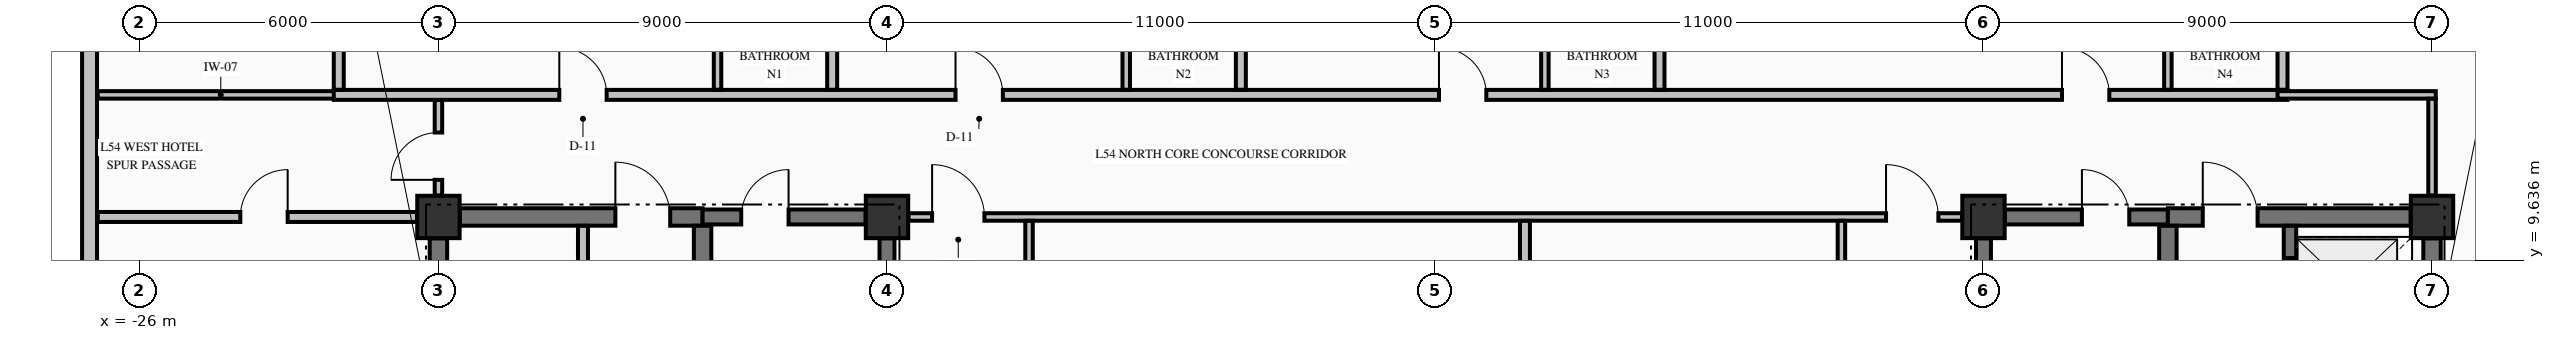
"""IFC4 building model, lengths in metres.
Left out: names, types, materials, properties, quantities, classifications, styles, units other than length and angle.
Written with IfcOpenShell. Run it as: python <this file> out.ifc"""

import sys

from ifc_helpers import new_model, si_unit, direction, frame, frame_2d, origin, origin_2d, place, context, subcontext, project, spatial, rectangle, extrude, element, fill, save


model = new_model("IFC4")
c1 = context("Model", 3, precision=1e-05, world=origin(), true_north=direction((0.0, 1.0)))
c2 = subcontext(c1, "Body", "Model", "MODEL_VIEW")
j1 = project(units=[si_unit("LENGTHUNIT", "METRE"), si_unit("PLANEANGLEUNIT", "RADIAN")], contexts=[c1])
p1 = place(None, origin())
s1 = spatial("IfcSite", under=j1, at=p1, CompositionType="ELEMENT")
p2 = place(p1, origin())
s2 = spatial("IfcBuilding", under=s1, at=p2, CompositionType="ELEMENT")
p3 = place(p2, frame((0.0, 0.0, 208.46)))
s3 = spatial("IfcBuildingStorey", under=s2, at=p3, CompositionType="ELEMENT", Elevation=208.46)
for number, where, z_axis, x_axis in (
    (1, (-20.0, 10.5, -0.25), (0.0, 0.0, 1.0), (1.0, 0.0, 0.0)),
    (2, (-11.0, 10.5, -0.25), (0.0, 0.0, 1.0), (1.0, 0.0, 0.0)),
    (3, (11.0, 10.5, -0.25), (0.0, 0.0, 1.0), (1.0, 0.0, 0.0)),
    (4, (20.0, 10.5, -0.25), (0.0, 0.0, 1.0), (1.0, 0.0, 0.0)),
):
    element("IfcColumn", number, at=place(p3, frame(where, z_axis=z_axis, x_axis=x_axis)), inside=s3, PredefinedType="COLUMN", context=c2, shape_type="SweptSolid", body=[
        extrude(rectangle(XDim=0.85, YDim=0.85, at=origin_2d()), origin(), (0.0, 0.0, 1.0), 3.325),
    ])
p4 = place(p3, frame((-27.0, 18.97, 0.0), z_axis=(0.0, 0.0, 1.0), x_axis=(0.0, -1.0, 0.0)))
e5 = element("IfcWall", 5, at=p4, inside=s3, PredefinedType="STANDARD", context=c2, shape_type="SweptSolid", body=[
    extrude(rectangle(XDim=9.44, YDim=0.3, at=frame_2d((4.72, 0.0))), origin(), (0.0, 0.0, 1.0), 2.467),
])
p5 = place(p3, frame((-19.571, 10.5, 0.0), z_axis=(0.0, 0.0, 1.0), x_axis=(1.0, 0.0, 0.0)))
e6 = element("IfcWall", 6, at=p5, inside=s3, PredefinedType="SHEAR", context=c2, shape_type="SweptSolid", body=[
    extrude(rectangle(XDim=4.871, YDim=0.35, at=frame_2d((2.436, 0.0))), origin(), (0.0, 0.0, 1.0), 3.075),
])
p6 = place(p5, frame((3.121, 0.0, 0.0)))
e7 = element("IfcOpeningElement", 7, at=p6, cuts=e6, PredefinedType="OPENING", context=c2, shape_type="SweptSolid", body=[
    extrude(rectangle(XDim=1.1, YDim=2.15, at=frame_2d((0.55, 1.075))), frame((0.0, 0.185, 0.0), z_axis=(0.0, -1.0, 0.0), x_axis=(1.0, 0.0, 0.0)), (0.0, 0.0, 1.0), 0.37),
])
p7 = place(p3, frame((-14.7, 10.5, 0.0), z_axis=(0.0, 0.0, 1.0), x_axis=(1.0, 0.0, 0.0)))
e8 = element("IfcWall", 8, at=p7, inside=s3, PredefinedType="SHEAR", context=c2, shape_type="SweptSolid", body=[
    extrude(rectangle(XDim=3.271, YDim=0.3, at=frame_2d((1.635, 0.0))), origin(), (0.0, 0.0, 1.0), 3.075),
])
p8 = place(p7, frame((0.775, 0.0, 0.0)))
e9 = element("IfcOpeningElement", 9, at=p8, cuts=e8, PredefinedType="OPENING", context=c2, shape_type="SweptSolid", body=[
    extrude(rectangle(XDim=0.95, YDim=2.15, at=frame_2d((0.475, 1.075))), frame((0.0, 0.16, 0.0), z_axis=(0.0, -1.0, 0.0), x_axis=(1.0, 0.0, 0.0)), (0.0, 0.0, 1.0), 0.32),
])
p9 = place(p3, frame((11.429, 10.5, 0.0), z_axis=(0.0, 0.0, 1.0), x_axis=(1.0, 0.0, 0.0)))
e10 = element("IfcWall", 10, at=p9, inside=s3, PredefinedType="SHEAR", context=c2, shape_type="SweptSolid", body=[
    extrude(rectangle(XDim=3.271, YDim=0.3, at=frame_2d((1.635, 0.0))), origin(), (0.0, 0.0, 1.0), 3.075),
])
p10 = place(p9, frame((1.546, 0.0, 0.0)))
e11 = element("IfcOpeningElement", 11, at=p10, cuts=e10, PredefinedType="OPENING", context=c2, shape_type="SweptSolid", body=[
    extrude(rectangle(XDim=0.95, YDim=2.15, at=frame_2d((0.475, 1.075))), frame((0.0, 0.16, 0.0), z_axis=(0.0, -1.0, 0.0), x_axis=(1.0, 0.0, 0.0)), (0.0, 0.0, 1.0), 0.32),
])
p11 = place(p3, frame((14.7, 10.5, 0.0), z_axis=(0.0, 0.0, 1.0), x_axis=(1.0, 0.0, 0.0)))
e12 = element("IfcWall", 12, at=p11, inside=s3, PredefinedType="SHEAR", context=c2, shape_type="SweptSolid", body=[
    extrude(rectangle(XDim=4.871, YDim=0.35, at=frame_2d((2.436, 0.0))), origin(), (0.0, 0.0, 1.0), 3.075),
])
p12 = place(p11, frame((0.7, 0.0, 0.0)))
e13 = element("IfcOpeningElement", 13, at=p12, cuts=e12, PredefinedType="OPENING", context=c2, shape_type="SweptSolid", body=[
    extrude(rectangle(XDim=1.1, YDim=2.15, at=frame_2d((0.55, 1.075))), frame((0.0, 0.185, 0.0), z_axis=(0.0, -1.0, 0.0), x_axis=(1.0, 0.0, 0.0)), (0.0, 0.0, 1.0), 0.37),
])
p13 = place(p3, frame((-26.835, 10.5, 0.0), z_axis=(0.0, 0.0, 1.0), x_axis=(1.0, 0.0, 0.0)))
e14 = element("IfcWall", 14, at=p13, inside=s3, PredefinedType="PARTITIONING", context=c2, shape_type="SweptSolid", body=[
    extrude(rectangle(XDim=6.404, YDim=0.2, at=frame_2d((3.202, 0.0))), origin(), (0.0, 0.0, 1.0), 3.075),
])
p14 = place(p13, frame((2.86, 0.0, 0.0)))
e15 = element("IfcOpeningElement", 15, at=p14, cuts=e14, PredefinedType="OPENING", context=c2, shape_type="SweptSolid", body=[
    extrude(rectangle(XDim=0.95, YDim=2.15, at=frame_2d((0.475, 1.075))), frame((0.0, 0.11, 0.0), z_axis=(0.0, -1.0, 0.0), x_axis=(1.0, 0.0, 0.0)), (0.0, 0.0, 1.0), 0.22),
])
p15 = place(p3, frame((-10.569, 10.5, 0.0), z_axis=(0.0, 0.0, 1.0), x_axis=(1.0, 0.0, 0.0)))
e16 = element("IfcWall", 16, at=p15, inside=s3, PredefinedType="PARTITIONING", context=c2, shape_type="SweptSolid", body=[
    extrude(rectangle(XDim=21.138, YDim=0.15, at=frame_2d((10.569, 0.0))), origin(), (0.0, 0.0, 1.0), 3.075),
])
p16 = place(p15, frame((0.474, 0.0, 0.0)))
e17 = element("IfcOpeningElement", 17, at=p16, cuts=e16, PredefinedType="OPENING", context=c2, shape_type="SweptSolid", body=[
    extrude(rectangle(XDim=1.05, YDim=2.15, at=frame_2d((0.525, 1.075))), frame((0.0, 0.085, 0.0), z_axis=(0.0, -1.0, 0.0), x_axis=(1.0, 0.0, 0.0)), (0.0, 0.0, 1.0), 0.17),
])
p17 = place(p15, frame((19.614, 0.0, 0.0)))
e18 = element("IfcOpeningElement", 18, at=p17, cuts=e16, PredefinedType="OPENING", context=c2, shape_type="SweptSolid", body=[
    extrude(rectangle(XDim=1.05, YDim=2.15, at=frame_2d((0.525, 1.075))), frame((0.0, 0.085, 0.0), z_axis=(0.0, -1.0, 0.0), x_axis=(1.0, 0.0, 0.0)), (0.0, 0.0, 1.0), 0.17),
])
p18 = place(p3, frame((-26.835, 12.95, 0.0), z_axis=(0.0, 0.0, 1.0), x_axis=(1.0, 0.0, 0.0)))
e19 = element("IfcWall", 19, at=p18, inside=s3, PredefinedType="PARTITIONING", context=c2, shape_type="SweptSolid", body=[
    extrude(rectangle(XDim=4.935, YDim=0.15, at=frame_2d((2.468, 0.0))), origin(), (0.0, 0.0, 1.0), 3.075),
])
p19 = place(p3, frame((-22.1, 12.95, 0.0), z_axis=(0.0, 0.0, 1.0), x_axis=(1.0, 0.0, 0.0)))
e20 = element("IfcWall", 20, at=p19, inside=s3, PredefinedType="PARTITIONING", context=c2, shape_type="SweptSolid", body=[
    extrude(rectangle(XDim=39.2, YDim=0.2, at=frame_2d((19.6, 0.0))), origin(), (0.0, 0.0, 1.0), 3.075),
])
p20 = place(p19, frame((4.525, 0.0, 0.0)))
e21 = element("IfcOpeningElement", 21, at=p20, cuts=e20, PredefinedType="OPENING", context=c2, shape_type="SweptSolid", body=[
    extrude(rectangle(XDim=0.95, YDim=2.15, at=frame_2d((0.475, 1.075))), frame((0.0, 0.11, 0.0), z_axis=(0.0, -1.0, 0.0), x_axis=(1.0, 0.0, 0.0)), (0.0, 0.0, 1.0), 0.22),
])
p21 = place(p19, frame((12.475, 0.0, 0.0)))
e22 = element("IfcOpeningElement", 22, at=p21, cuts=e20, PredefinedType="OPENING", context=c2, shape_type="SweptSolid", body=[
    extrude(rectangle(XDim=0.95, YDim=2.15, at=frame_2d((0.475, 1.075))), frame((0.0, 0.11, 0.0), z_axis=(0.0, -1.0, 0.0), x_axis=(1.0, 0.0, 0.0)), (0.0, 0.0, 1.0), 0.22),
])
p22 = place(p19, frame((22.175, 0.0, 0.0)))
e23 = element("IfcOpeningElement", 23, at=p22, cuts=e20, PredefinedType="OPENING", context=c2, shape_type="SweptSolid", body=[
    extrude(rectangle(XDim=0.95, YDim=2.15, at=frame_2d((0.475, 1.075))), frame((0.0, 0.11, 0.0), z_axis=(0.0, -1.0, 0.0), x_axis=(1.0, 0.0, 0.0)), (0.0, 0.0, 1.0), 0.22),
])
p23 = place(p19, frame((34.675, 0.0, 0.0)))
e24 = element("IfcOpeningElement", 24, at=p23, cuts=e20, PredefinedType="OPENING", context=c2, shape_type="SweptSolid", body=[
    extrude(rectangle(XDim=0.95, YDim=2.15, at=frame_2d((0.475, 1.075))), frame((0.0, 0.11, 0.0), z_axis=(0.0, -1.0, 0.0), x_axis=(1.0, 0.0, 0.0)), (0.0, 0.0, 1.0), 0.22),
])
p24 = place(p3, frame((16.9, 12.95, 0.0), z_axis=(0.0, 0.0, 1.0), x_axis=(1.0, 0.0, 0.0)))
e25 = element("IfcWall", 25, at=p24, inside=s3, PredefinedType="PARTITIONING", context=c2, shape_type="SweptSolid", body=[
    extrude(rectangle(XDim=3.175, YDim=0.15, at=frame_2d((1.587, 0.0))), origin(), (0.0, 0.0, 1.0), 3.075),
])
p25 = place(p3, frame((-20.0, 5.327, 0.0), z_axis=(0.0, 0.0, 1.0), x_axis=(0.0, 1.0, 0.0)))
e26 = element("IfcWall", 26, at=p25, inside=s3, PredefinedType="SHEAR", context=c2, shape_type="SweptSolid", body=[
    extrude(rectangle(XDim=4.744, YDim=0.35, at=frame_2d((2.372, 0.0))), origin(), (0.0, 0.0, 1.0), 3.075),
])
p26 = place(p3, frame((-14.7, 5.852, 0.0), z_axis=(0.0, 0.0, 1.0), x_axis=(0.0, 1.0, 0.0)))
e27 = element("IfcWall", 27, at=p26, inside=s3, PredefinedType="SHEAR", context=c2, shape_type="SweptSolid", body=[
    extrude(rectangle(XDim=4.471, YDim=0.35, at=frame_2d((2.235, 0.0))), origin(), (0.0, 0.0, 1.0), 3.075),
])
for number, where, z_axis, x_axis in (
    (28, (-11.0, 5.852, 0.0), (0.0, 0.0, 1.0), (0.0, 1.0, 0.0)),
    (29, (11.0, 5.852, 0.0), (0.0, 0.0, 1.0), (0.0, 1.0, 0.0)),
):
    element("IfcWall", number, at=place(p3, frame(where, z_axis=z_axis, x_axis=x_axis)), inside=s3, PredefinedType="SHEAR", context=c2, shape_type="SweptSolid", body=[
        extrude(rectangle(XDim=4.219, YDim=0.3, at=frame_2d((2.109, 0.0))), origin(), (0.0, 0.0, 1.0), 3.075),
    ])
p27 = place(p3, frame((14.7, 5.852, 0.0), z_axis=(0.0, 0.0, 1.0), x_axis=(0.0, 1.0, 0.0)))
e30 = element("IfcWall", 30, at=p27, inside=s3, PredefinedType="SHEAR", context=c2, shape_type="SweptSolid", body=[
    extrude(rectangle(XDim=4.471, YDim=0.35, at=frame_2d((2.235, 0.0))), origin(), (0.0, 0.0, 1.0), 3.075),
])
p28 = place(p3, frame((17.15, 7.877, 0.0), z_axis=(0.0, 0.0, 1.0), x_axis=(0.0, 1.0, 0.0)))
e31 = element("IfcWall", 31, at=p28, inside=s3, PredefinedType="SOLIDWALL", context=c2, shape_type="SweptSolid", body=[
    extrude(rectangle(XDim=2.446, YDim=0.25, at=frame_2d((1.223, 0.0))), origin(), (0.0, 0.0, 1.0), 3.075),
])
p29 = place(p28, frame((0.698, 0.0, 0.0)))
e32 = element("IfcOpeningElement", 32, at=p29, cuts=e31, PredefinedType="OPENING", context=c2, shape_type="SweptSolid", body=[
    extrude(rectangle(XDim=1.1, YDim=2.2, at=frame_2d((0.55, 1.1))), frame((0.0, 0.135, 0.0), z_axis=(0.0, -1.0, 0.0), x_axis=(1.0, 0.0, 0.0)), (0.0, 0.0, 1.0), 0.27),
])
p30 = place(p3, frame((20.0, 7.877, 0.0), z_axis=(0.0, 0.0, 1.0), x_axis=(0.0, 1.0, 0.0)))
e33 = element("IfcWall", 33, at=p30, inside=s3, PredefinedType="SHEAR", context=c2, shape_type="SweptSolid", body=[
    extrude(rectangle(XDim=2.194, YDim=0.35, at=frame_2d((1.097, 0.0))), origin(), (0.0, 0.0, 1.0), 3.075),
])
p31 = place(p3, frame((-22.0, 13.053, 0.0), z_axis=(0.0, 0.0, 1.0), x_axis=(0.0, 1.0, 0.0)))
e34 = element("IfcWall", 34, at=p31, inside=s3, PredefinedType="PARTITIONING", context=c2, shape_type="SweptSolid", body=[
    extrude(rectangle(XDim=5.941, YDim=0.2, at=frame_2d((2.97, 0.0))), origin(), (0.0, 0.0, 1.0), 3.075),
])
p32 = place(p3, frame((-20.0, 10.931, 0.0), z_axis=(0.0, 0.0, 1.0), x_axis=(0.0, 1.0, 0.0)))
e35 = element("IfcWall", 35, at=p32, inside=s3, PredefinedType="PARTITIONING", context=c2, shape_type="SweptSolid", body=[
    extrude(rectangle(XDim=1.916, YDim=0.15, at=frame_2d((0.958, 0.0))), origin(), (0.0, 0.0, 1.0), 2.267),
])
p33 = place(p32, frame((0.314, 0.0, 0.0)))
e36 = element("IfcOpeningElement", 36, at=p33, cuts=e35, PredefinedType="OPENING", context=c2, shape_type="SweptSolid", body=[
    extrude(rectangle(XDim=0.95, YDim=2.15, at=frame_2d((0.475, 1.075))), frame((0.0, 0.085, 0.0), z_axis=(0.0, -1.0, 0.0), x_axis=(1.0, 0.0, 0.0)), (0.0, 0.0, 1.0), 0.17),
])
p34 = place(p3, frame((-17.1, 5.328, 0.0), z_axis=(0.0, 0.0, 1.0), x_axis=(0.0, 1.0, 0.0)))
e37 = element("IfcWall", 37, at=p34, inside=s3, PredefinedType="PARTITIONING", context=c2, shape_type="SweptSolid", body=[
    extrude(rectangle(XDim=4.994, YDim=0.2, at=frame_2d((2.497, 0.0))), origin(), (0.0, 0.0, 1.0), 3.075),
])
p35 = place(p34, frame((2.072, 0.0, 0.0)))
e38 = element("IfcOpeningElement", 38, at=p35, cuts=e37, PredefinedType="OPENING", context=c2, shape_type="SweptSolid", body=[
    extrude(rectangle(XDim=0.9, YDim=2.15, at=frame_2d((0.45, 1.075))), frame((0.0, 0.11, 0.0), z_axis=(0.0, -1.0, 0.0), x_axis=(1.0, 0.0, 0.0)), (0.0, 0.0, 1.0), 0.22),
])
p36 = place(p3, frame((-14.4, 13.053, 0.0), z_axis=(0.0, 0.0, 1.0), x_axis=(0.0, 1.0, 0.0)))
e39 = element("IfcWall", 39, at=p36, inside=s3, PredefinedType="PARTITIONING", context=c2, shape_type="SweptSolid", body=[
    extrude(rectangle(XDim=2.669, YDim=0.15, at=frame_2d((1.334, 0.0))), origin(), (0.0, 0.0, 1.0), 3.075),
])
p37 = place(p3, frame((-12.1, 13.053, 0.0), z_axis=(0.0, 0.0, 1.0), x_axis=(0.0, 1.0, 0.0)))
e40 = element("IfcWall", 40, at=p37, inside=s3, PredefinedType="PARTITIONING", context=c2, shape_type="SweptSolid", body=[
    extrude(rectangle(XDim=2.669, YDim=0.2, at=frame_2d((1.334, 0.0))), origin(), (0.0, 0.0, 1.0), 3.075),
])
p38 = place(p3, frame((-8.15, 3.653, 0.0), z_axis=(0.0, 0.0, 1.0), x_axis=(0.0, 1.0, 0.0)))
e41 = element("IfcWall", 41, at=p38, inside=s3, PredefinedType="PARTITIONING", context=c2, shape_type="SweptSolid", body=[
    extrude(rectangle(XDim=6.769, YDim=0.15, at=frame_2d((3.385, 0.0))), origin(), (0.0, 0.0, 1.0), 3.075),
])
p39 = place(p38, frame((2.877, 0.0, 0.0)))
e42 = element("IfcOpeningElement", 42, at=p39, cuts=e41, PredefinedType="OPENING", context=c2, shape_type="SweptSolid", body=[
    extrude(rectangle(XDim=1.0, YDim=2.15, at=frame_2d((0.5, 1.075))), frame((0.0, 0.085, 0.0), z_axis=(0.0, -1.0, 0.0), x_axis=(1.0, 0.0, 0.0)), (0.0, 0.0, 1.0), 0.17),
])
p40 = place(p3, frame((-6.2, 13.053, 0.0), z_axis=(0.0, 0.0, 1.0), x_axis=(0.0, 1.0, 0.0)))
e43 = element("IfcWall", 43, at=p40, inside=s3, PredefinedType="PARTITIONING", context=c2, shape_type="SweptSolid", body=[
    extrude(rectangle(XDim=2.669, YDim=0.15, at=frame_2d((1.334, 0.0))), origin(), (0.0, 0.0, 1.0), 3.075),
])
p41 = place(p3, frame((-3.9, 13.053, 0.0), z_axis=(0.0, 0.0, 1.0), x_axis=(0.0, 1.0, 0.0)))
e44 = element("IfcWall", 44, at=p41, inside=s3, PredefinedType="PARTITIONING", context=c2, shape_type="SweptSolid", body=[
    extrude(rectangle(XDim=2.669, YDim=0.2, at=frame_2d((1.334, 0.0))), origin(), (0.0, 0.0, 1.0), 3.075),
])
p42 = place(p3, frame((1.8, 3.653, 0.0), z_axis=(0.0, 0.0, 1.0), x_axis=(0.0, 1.0, 0.0)))
e45 = element("IfcWall", 45, at=p42, inside=s3, PredefinedType="PARTITIONING", context=c2, shape_type="SweptSolid", body=[
    extrude(rectangle(XDim=6.769, YDim=0.2, at=frame_2d((3.385, 0.0))), origin(), (0.0, 0.0, 1.0), 3.075),
])
p43 = place(p3, frame((2.2, 13.053, 0.0), z_axis=(0.0, 0.0, 1.0), x_axis=(0.0, 1.0, 0.0)))
e46 = element("IfcWall", 46, at=p43, inside=s3, PredefinedType="PARTITIONING", context=c2, shape_type="SweptSolid", body=[
    extrude(rectangle(XDim=2.669, YDim=0.15, at=frame_2d((1.334, 0.0))), origin(), (0.0, 0.0, 1.0), 3.075),
])
p44 = place(p3, frame((4.5, 13.053, 0.0), z_axis=(0.0, 0.0, 1.0), x_axis=(0.0, 1.0, 0.0)))
e47 = element("IfcWall", 47, at=p44, inside=s3, PredefinedType="PARTITIONING", context=c2, shape_type="SweptSolid", body=[
    extrude(rectangle(XDim=2.669, YDim=0.2, at=frame_2d((1.334, 0.0))), origin(), (0.0, 0.0, 1.0), 3.075),
])
p45 = place(p3, frame((8.15, -2.097, 0.0), z_axis=(0.0, 0.0, 1.0), x_axis=(0.0, 1.0, 0.0)))
e48 = element("IfcWall", 48, at=p45, inside=s3, PredefinedType="PARTITIONING", context=c2, shape_type="SweptSolid", body=[
    extrude(rectangle(XDim=12.519, YDim=0.15, at=frame_2d((6.26, 0.0))), origin(), (0.0, 0.0, 1.0), 3.075),
])
p46 = place(p45, frame((5.697, 0.0, 0.0)))
e49 = element("IfcOpeningElement", 49, at=p46, cuts=e48, PredefinedType="OPENING", context=c2, shape_type="SweptSolid", body=[
    extrude(rectangle(XDim=1.1, YDim=2.15, at=frame_2d((0.55, 1.075))), frame((0.0, 0.085, 0.0), z_axis=(0.0, -1.0, 0.0), x_axis=(1.0, 0.0, 0.0)), (0.0, 0.0, 1.0), 0.17),
])
p47 = place(p3, frame((14.7, 13.053, 0.0), z_axis=(0.0, 0.0, 1.0), x_axis=(0.0, 1.0, 0.0)))
e50 = element("IfcWall", 50, at=p47, inside=s3, PredefinedType="PARTITIONING", context=c2, shape_type="SweptSolid", body=[
    extrude(rectangle(XDim=2.669, YDim=0.15, at=frame_2d((1.334, 0.0))), origin(), (0.0, 0.0, 1.0), 3.075),
])
p48 = place(p3, frame((17.0, 13.053, 0.0), z_axis=(0.0, 0.0, 1.0), x_axis=(0.0, 1.0, 0.0)))
e51 = element("IfcWall", 51, at=p48, inside=s3, PredefinedType="PARTITIONING", context=c2, shape_type="SweptSolid", body=[
    extrude(rectangle(XDim=2.669, YDim=0.2, at=frame_2d((1.334, 0.0))), origin(), (0.0, 0.0, 1.0), 3.075),
])
p49 = place(p3, frame((20.0, 10.931, 0.0), z_axis=(0.0, 0.0, 1.0), x_axis=(0.0, 1.0, 0.0)))
e52 = element("IfcWall", 52, at=p49, inside=s3, PredefinedType="PARTITIONING", context=c2, shape_type="SweptSolid", body=[
    extrude(rectangle(XDim=1.941, YDim=0.15, at=frame_2d((0.971, 0.0))), origin(), (0.0, 0.0, 1.0), 2.267),
])
p50 = place(p8, origin())
e53 = element("IfcDoor", 53, at=p50, inside=s3, OperationType="SINGLE_SWING_RIGHT", PredefinedType="DOOR", context=c2, shape_type="SweptSolid", body=[
    extrude(rectangle(XDim=0.95, YDim=2.15, at=frame_2d((0.475, 1.075))), frame((0.0, 0.025, 0.0), z_axis=(0.0, -1.0, 0.0), x_axis=(1.0, 0.0, 0.0)), (0.0, 0.0, 1.0), 0.05),
])
fill(e9, e53)
p51 = place(p10, origin())
e54 = element("IfcDoor", 54, at=p51, inside=s3, OperationType="SINGLE_SWING_LEFT", PredefinedType="DOOR", context=c2, shape_type="SweptSolid", body=[
    extrude(rectangle(XDim=0.95, YDim=2.15, at=frame_2d((0.475, 1.075))), frame((0.0, 0.025, 0.0), z_axis=(0.0, -1.0, 0.0), x_axis=(1.0, 0.0, 0.0)), (0.0, 0.0, 1.0), 0.05),
])
fill(e11, e54)
p52 = place(p6, origin())
e55 = element("IfcDoor", 55, at=p52, inside=s3, OperationType="SINGLE_SWING_LEFT", PredefinedType="DOOR", context=c2, shape_type="SweptSolid", body=[
    extrude(rectangle(XDim=1.1, YDim=2.15, at=frame_2d((0.55, 1.075))), frame((0.0, 0.025, 0.0), z_axis=(0.0, -1.0, 0.0), x_axis=(1.0, 0.0, 0.0)), (0.0, 0.0, 1.0), 0.05),
])
fill(e7, e55)
p53 = place(p29, origin())
e56 = element("IfcDoor", 56, at=p53, inside=s3, OperationType="SLIDING_TO_RIGHT", PredefinedType="DOOR", context=c2, shape_type="SweptSolid", body=[
    extrude(rectangle(XDim=1.1, YDim=2.2, at=frame_2d((0.55, 1.1))), frame((0.0, 0.025, 0.0), z_axis=(0.0, -1.0, 0.0), x_axis=(1.0, 0.0, 0.0)), (0.0, 0.0, 1.0), 0.05),
])
fill(e32, e56)
p54 = place(p12, origin())
e57 = element("IfcDoor", 57, at=p54, inside=s3, OperationType="SINGLE_SWING_LEFT", PredefinedType="DOOR", context=c2, shape_type="SweptSolid", body=[
    extrude(rectangle(XDim=1.1, YDim=2.15, at=frame_2d((0.55, 1.075))), frame((0.0, 0.025, 0.0), z_axis=(0.0, -1.0, 0.0), x_axis=(1.0, 0.0, 0.0)), (0.0, 0.0, 1.0), 0.05),
])
fill(e13, e57)
p55 = place(p16, origin())
e58 = element("IfcDoor", 58, at=p55, inside=s3, OperationType="SINGLE_SWING_LEFT", PredefinedType="DOOR", context=c2, shape_type="SweptSolid", body=[
    extrude(rectangle(XDim=1.05, YDim=2.15, at=frame_2d((0.525, 1.075))), frame((0.0, 0.025, 0.0), z_axis=(0.0, -1.0, 0.0), x_axis=(1.0, 0.0, 0.0)), (0.0, 0.0, 1.0), 0.05),
])
fill(e17, e58)
p56 = place(p17, origin())
e59 = element("IfcDoor", 59, at=p56, inside=s3, OperationType="SINGLE_SWING_LEFT", PredefinedType="DOOR", context=c2, shape_type="SweptSolid", body=[
    extrude(rectangle(XDim=1.05, YDim=2.15, at=frame_2d((0.525, 1.075))), frame((0.0, 0.025, 0.0), z_axis=(0.0, -1.0, 0.0), x_axis=(1.0, 0.0, 0.0)), (0.0, 0.0, 1.0), 0.05),
])
fill(e18, e59)
p57 = place(p20, origin())
e60 = element("IfcDoor", 60, at=p57, inside=s3, OperationType="SINGLE_SWING_LEFT", PredefinedType="DOOR", context=c2, shape_type="SweptSolid", body=[
    extrude(rectangle(XDim=0.95, YDim=2.15, at=frame_2d((0.475, 1.075))), frame((0.0, 0.025, 0.0), z_axis=(0.0, -1.0, 0.0), x_axis=(1.0, 0.0, 0.0)), (0.0, 0.0, 1.0), 0.05),
])
fill(e21, e60)
p58 = place(p21, origin())
e61 = element("IfcDoor", 61, at=p58, inside=s3, OperationType="SINGLE_SWING_LEFT", PredefinedType="DOOR", context=c2, shape_type="SweptSolid", body=[
    extrude(rectangle(XDim=0.95, YDim=2.15, at=frame_2d((0.475, 1.075))), frame((0.0, 0.025, 0.0), z_axis=(0.0, -1.0, 0.0), x_axis=(1.0, 0.0, 0.0)), (0.0, 0.0, 1.0), 0.05),
])
fill(e22, e61)
p59 = place(p22, origin())
e62 = element("IfcDoor", 62, at=p59, inside=s3, OperationType="SINGLE_SWING_LEFT", PredefinedType="DOOR", context=c2, shape_type="SweptSolid", body=[
    extrude(rectangle(XDim=0.95, YDim=2.15, at=frame_2d((0.475, 1.075))), frame((0.0, 0.025, 0.0), z_axis=(0.0, -1.0, 0.0), x_axis=(1.0, 0.0, 0.0)), (0.0, 0.0, 1.0), 0.05),
])
fill(e23, e62)
p60 = place(p23, origin())
e63 = element("IfcDoor", 63, at=p60, inside=s3, OperationType="SINGLE_SWING_LEFT", PredefinedType="DOOR", context=c2, shape_type="SweptSolid", body=[
    extrude(rectangle(XDim=0.95, YDim=2.15, at=frame_2d((0.475, 1.075))), frame((0.0, 0.025, 0.0), z_axis=(0.0, -1.0, 0.0), x_axis=(1.0, 0.0, 0.0)), (0.0, 0.0, 1.0), 0.05),
])
fill(e24, e63)
p61 = place(p33, origin())
e64 = element("IfcDoor", 64, at=p61, inside=s3, OperationType="SINGLE_SWING_LEFT", PredefinedType="DOOR", context=c2, shape_type="SweptSolid", body=[
    extrude(rectangle(XDim=0.95, YDim=2.15, at=frame_2d((0.475, 1.075))), frame((0.0, 0.025, 0.0), z_axis=(0.0, -1.0, 0.0), x_axis=(1.0, 0.0, 0.0)), (0.0, 0.0, 1.0), 0.05),
])
fill(e36, e64)
p62 = place(p14, origin())
e65 = element("IfcDoor", 65, at=p62, inside=s3, OperationType="SINGLE_SWING_RIGHT", PredefinedType="DOOR", context=c2, shape_type="SweptSolid", body=[
    extrude(rectangle(XDim=0.95, YDim=2.15, at=frame_2d((0.475, 1.075))), frame((0.0, 0.025, 0.0), z_axis=(0.0, -1.0, 0.0), x_axis=(1.0, 0.0, 0.0)), (0.0, 0.0, 1.0), 0.05),
])
fill(e15, e65)
save(model, sys.argv[1])
